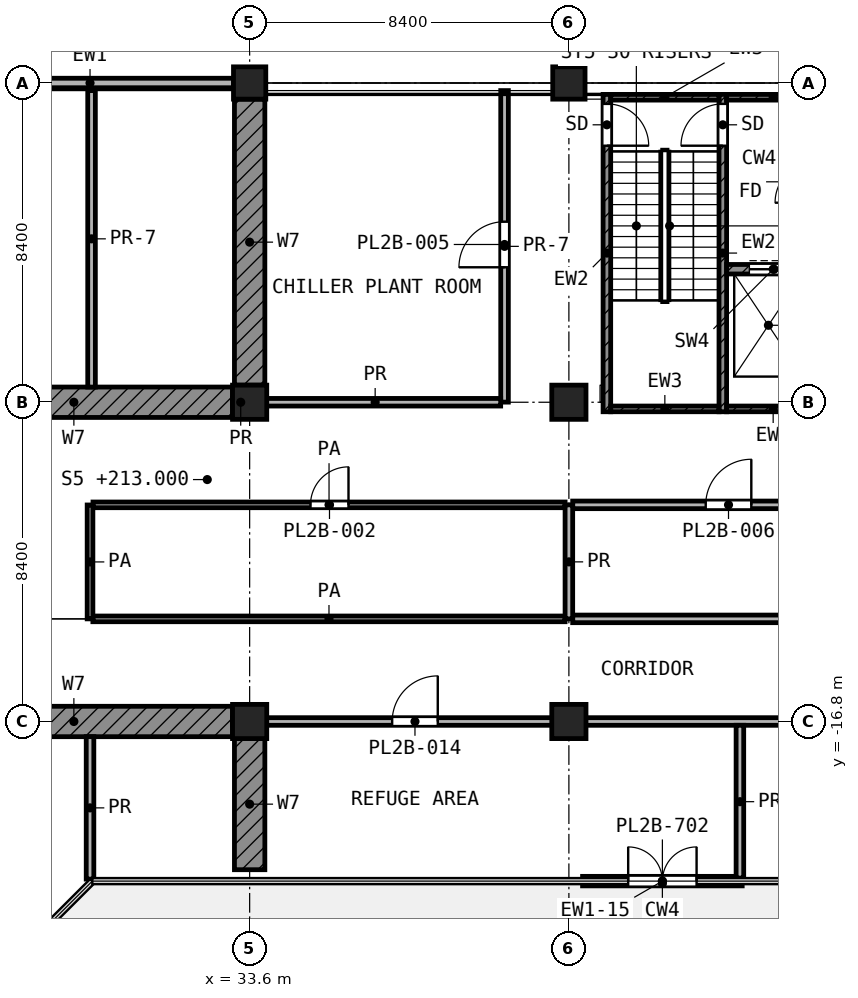
"""IFC4 building model, lengths in metres.
Left out: names, types, materials, properties, quantities, classifications, styles, units other than length and angle.
Written with IfcOpenShell. Run it as: python <this file> out.ifc"""

import sys

from ifc_helpers import new_model, si_unit, direction, frame, frame_2d, origin, origin_2d, place, context, subcontext, project, spatial, rectangle, extrude, element, fill, save


model = new_model("IFC4")
c1 = context("Model", 3, precision=1e-05, world=origin(), true_north=direction((0.0, 1.0)))
c2 = subcontext(c1, "Body", "Model", "MODEL_VIEW")
j1 = project(units=[si_unit("LENGTHUNIT", "METRE"), si_unit("PLANEANGLEUNIT", "RADIAN")], contexts=[c1])
p1 = place(None, origin())
s1 = spatial("IfcSite", under=j1, at=p1, CompositionType="ELEMENT")
p2 = place(p1, origin())
s2 = spatial("IfcBuilding", under=s1, at=p2, CompositionType="ELEMENT")
p3 = place(p2, frame((0.0, 0.0, 213.0)))
s3 = spatial("IfcBuildingStorey", under=s2, at=p3, CompositionType="ELEMENT", Elevation=213.0)
for number, where, z_axis, x_axis in (
    (1, (33.6, 0.0, 0.0), (0.0, 0.0, 1.0), (1.0, 0.0, 0.0)),
    (2, (42.0, 0.0, 0.0), (0.0, 0.0, 1.0), (1.0, 0.0, 0.0)),
):
    element("IfcColumn", number, at=place(p3, frame(where, z_axis=z_axis, x_axis=x_axis)), inside=s3, PredefinedType="COLUMN", context=c2, shape_type="SweptSolid", body=[
        extrude(rectangle(XDim=0.85, YDim=0.85, at=origin_2d()), origin(), (0.0, 0.0, 1.0), 5.0),
    ])
p4 = place(p3, frame((33.6, -8.4, 0.0), z_axis=(0.0, 0.0, 1.0), x_axis=(1.0, 0.0, 0.0)))
e3 = element("IfcColumn", 3, at=p4, inside=s3, PredefinedType="COLUMN", context=c2, shape_type="SweptSolid", body=[
    extrude(rectangle(XDim=0.9, YDim=0.9, at=origin_2d()), origin(), (0.0, 0.0, 1.0), 5.0),
])
for number, where, z_axis, x_axis in (
    (4, (42.0, -8.4, 0.0), (0.0, 0.0, 1.0), (1.0, 0.0, 0.0)),
    (5, (33.6, -16.8, 0.0), (0.0, 0.0, 1.0), (1.0, 0.0, 0.0)),
    (6, (42.0, -16.8, 0.0), (0.0, 0.0, 1.0), (1.0, 0.0, 0.0)),
):
    element("IfcColumn", number, at=place(p3, frame(where, z_axis=z_axis, x_axis=x_axis)), inside=s3, PredefinedType="COLUMN", context=c2, shape_type="SweptSolid", body=[
        extrude(rectangle(XDim=0.9, YDim=0.9, at=origin_2d()), origin(), (0.0, 0.0, 1.0), 5.0),
    ])
for number, where, z_axis, x_axis in (
    (7, (24.8, -8.4, 0.0), (0.0, 0.0, 1.0), (1.0, 0.0, 0.0)),
    (8, (24.8, -16.8, 0.0), (0.0, 0.0, 1.0), (1.0, 0.0, 0.0)),
):
    element("IfcWall", number, at=place(p3, frame(where, z_axis=z_axis, x_axis=x_axis)), inside=s3, PredefinedType="SHEAR", context=c2, shape_type="SweptSolid", body=[
        extrude(rectangle(XDim=8.35, YDim=0.8, at=frame_2d((4.175, 0.0))), origin(), (0.0, 0.0, 1.0), 4.4),
    ])
p5 = place(p3, frame((33.6, -0.425, 0.0), z_axis=(0.0, 0.0, 1.0), x_axis=(0.0, -1.0, 0.0)))
e9 = element("IfcWall", 9, at=p5, inside=s3, PredefinedType="SHEAR", context=c2, shape_type="SweptSolid", body=[
    extrude(rectangle(XDim=7.525, YDim=0.8, at=frame_2d((3.762, 0.0))), origin(), (0.0, 0.0, 1.0), 4.4),
])
p6 = place(p3, frame((33.6, -17.25, 0.0), z_axis=(0.0, 0.0, 1.0), x_axis=(0.0, -1.0, 0.0)))
e10 = element("IfcWall", 10, at=p6, inside=s3, PredefinedType="SHEAR", context=c2, shape_type="SweptSolid", body=[
    extrude(rectangle(XDim=3.45, YDim=0.8, at=frame_2d((1.725, 0.0))), origin(), (0.0, 0.0, 1.0), 4.4),
])
p7 = place(p3, frame((42.36, -21.0, 0.0), z_axis=(0.0, 0.0, 1.0), x_axis=(1.0, 0.0, 0.0)))
e11 = element("IfcWall", 11, at=p7, inside=s3, PredefinedType="SOLIDWALL", context=c2, shape_type="SweptSolid", body=[
    extrude(rectangle(XDim=4.2, YDim=0.25, at=frame_2d((2.1, 0.0))), origin(), (0.0, 0.0, 1.0), 4.24),
])
p8 = place(p7, frame((1.2, 0.0, 0.0)))
e12 = element("IfcOpeningElement", 12, at=p8, cuts=e11, PredefinedType="OPENING", context=c2, shape_type="SweptSolid", body=[
    extrude(rectangle(XDim=1.8, YDim=2.1, at=frame_2d((0.9, 1.05))), frame((0.0, 0.135, 0.0), z_axis=(0.0, -1.0, 0.0), x_axis=(1.0, 0.0, 0.0)), (0.0, 0.0, 1.0), 0.27),
])
p9 = place(p3, frame((33.175, 0.0, 0.0), z_axis=(0.0, 0.0, 1.0), x_axis=(-1.0, 0.0, 0.0)))
e13 = element("IfcWall", 13, at=p9, inside=s3, PredefinedType="SOLIDWALL", context=c2, shape_type="SweptSolid", body=[
    extrude(rectangle(XDim=7.55, YDim=0.25, at=frame_2d((3.775, 0.0))), origin(), (0.0, 0.0, 1.0), 3.2),
])
p10 = place(p3, frame((43.0, -8.65, 0.0), z_axis=(0.0, 0.0, 1.0), x_axis=(0.0, 1.0, 0.0)))
e14 = element("IfcWall", 14, at=p10, inside=s3, PredefinedType="SHEAR", context=c2, shape_type="SweptSolid", body=[
    extrude(rectangle(XDim=8.35, YDim=0.2, at=frame_2d((4.175, 0.0))), origin(), (0.0, 0.0, 1.0), 4.4),
])
p11 = place(p10, frame((7.0, 0.0, 0.0)))
e15 = element("IfcOpeningElement", 15, at=p11, cuts=e14, PredefinedType="OPENING", context=c2, shape_type="SweptSolid", body=[
    extrude(rectangle(XDim=1.1, YDim=2.1, at=frame_2d((0.55, 1.05))), frame((0.0, 0.11, 0.0), z_axis=(0.0, -1.0, 0.0), x_axis=(1.0, 0.0, 0.0)), (0.0, 0.0, 1.0), 0.22),
])
p12 = place(p3, frame((46.05, -8.65, 0.0), z_axis=(0.0, 0.0, 1.0), x_axis=(0.0, 1.0, 0.0)))
e16 = element("IfcWall", 16, at=p12, inside=s3, PredefinedType="SHEAR", context=c2, shape_type="SweptSolid", body=[
    extrude(rectangle(XDim=8.35, YDim=0.2, at=frame_2d((4.175, 0.0))), origin(), (0.0, 0.0, 1.0), 4.4),
])
p13 = place(p12, frame((7.0, 0.0, 0.0)))
e17 = element("IfcOpeningElement", 17, at=p13, cuts=e16, PredefinedType="OPENING", context=c2, shape_type="SweptSolid", body=[
    extrude(rectangle(XDim=1.1, YDim=2.1, at=frame_2d((0.55, 1.05))), frame((0.0, 0.11, 0.0), z_axis=(0.0, -1.0, 0.0), x_axis=(1.0, 0.0, 0.0)), (0.0, 0.0, 1.0), 0.22),
])
p14 = place(p3, frame((43.1, -0.375, 0.0), z_axis=(0.0, 0.0, 1.0), x_axis=(1.0, 0.0, 0.0)))
e18 = element("IfcWall", 18, at=p14, inside=s3, PredefinedType="SHEAR", context=c2, shape_type="SweptSolid", body=[
    extrude(rectangle(XDim=2.85, YDim=0.15, at=frame_2d((1.425, 0.0))), origin(), (0.0, 0.0, 1.0), 4.4),
])
p15 = place(p3, frame((46.15, -0.375, 0.0), z_axis=(0.0, 0.0, 1.0), x_axis=(1.0, 0.0, 0.0)))
e19 = element("IfcWall", 19, at=p15, inside=s3, PredefinedType="SHEAR", context=c2, shape_type="SweptSolid", body=[
    extrude(rectangle(XDim=2.45, YDim=0.15, at=frame_2d((1.225, 0.0))), origin(), (0.0, 0.0, 1.0), 4.4),
])
p16 = place(p3, frame((43.1, -8.575, 0.0), z_axis=(0.0, 0.0, 1.0), x_axis=(1.0, 0.0, 0.0)))
e20 = element("IfcWall", 20, at=p16, inside=s3, PredefinedType="SHEAR", context=c2, shape_type="SweptSolid", body=[
    extrude(rectangle(XDim=2.85, YDim=0.15, at=frame_2d((1.425, 0.0))), origin(), (0.0, 0.0, 1.0), 4.4),
])
p17 = place(p3, frame((46.15, -8.575, 0.0), z_axis=(0.0, 0.0, 1.0), x_axis=(1.0, 0.0, 0.0)))
e21 = element("IfcWall", 21, at=p17, inside=s3, PredefinedType="SHEAR", context=c2, shape_type="SweptSolid", body=[
    extrude(rectangle(XDim=2.45, YDim=0.15, at=frame_2d((1.225, 0.0))), origin(), (0.0, 0.0, 1.0), 4.4),
])
p18 = place(p3, frame((46.15, -4.9, 0.0), z_axis=(0.0, 0.0, 1.0), x_axis=(1.0, 0.0, 0.0)))
e22 = element("IfcWall", 22, at=p18, inside=s3, PredefinedType="SHEAR", context=c2, shape_type="SweptSolid", body=[
    extrude(rectangle(XDim=2.45, YDim=0.25, at=frame_2d((1.225, 0.0))), origin(), (0.0, 0.0, 1.0), 4.4),
])
p19 = place(p18, frame((0.6, 0.0, 0.0)))
e23 = element("IfcOpeningElement", 23, at=p19, cuts=e22, PredefinedType="OPENING", context=c2, shape_type="SweptSolid", body=[
    extrude(rectangle(XDim=1.3, YDim=2.1, at=frame_2d((0.65, 1.05))), frame((0.0, 0.135, 0.0), z_axis=(0.0, -1.0, 0.0), x_axis=(1.0, 0.0, 0.0)), (0.0, 0.0, 1.0), 0.27),
])
p20 = place(p3, frame((29.475, -14.1, 0.0), z_axis=(0.0, 0.0, 1.0), x_axis=(1.0, 0.0, 0.0)))
e24 = element("IfcWall", 24, at=p20, inside=s3, PredefinedType="PARTITIONING", context=c2, shape_type="SweptSolid", body=[
    extrude(rectangle(XDim=12.425, YDim=0.15, at=frame_2d((6.212, 0.0))), origin(), (0.0, 0.0, 1.0), 4.4),
])
p21 = place(p3, frame((29.478, -11.1, 0.0), z_axis=(0.0, 0.0, 1.0), x_axis=(1.0, 0.0, 0.0)))
e25 = element("IfcWall", 25, at=p21, inside=s3, PredefinedType="PARTITIONING", context=c2, shape_type="SweptSolid", body=[
    extrude(rectangle(XDim=12.422, YDim=0.15, at=frame_2d((6.211, 0.0))), origin(), (0.0, 0.0, 1.0), 4.4),
])
p22 = place(p21, frame((5.723, 0.0, 0.0)))
e26 = element("IfcOpeningElement", 26, at=p22, cuts=e25, PredefinedType="OPENING", context=c2, shape_type="SweptSolid", body=[
    extrude(rectangle(XDim=1.0, YDim=2.1, at=frame_2d((0.5, 1.05))), frame((0.0, 0.085, 0.0), z_axis=(0.0, -1.0, 0.0), x_axis=(1.0, 0.0, 0.0)), (0.0, 0.0, 1.0), 0.17),
])
p23 = place(p3, frame((29.4, -14.1, 0.0), z_axis=(0.0, 0.0, 1.0), x_axis=(0.0, 1.0, 0.0)))
e27 = element("IfcWall", 27, at=p23, inside=s3, PredefinedType="PARTITIONING", context=c2, shape_type="SweptSolid", body=[
    extrude(rectangle(XDim=2.997, YDim=0.15, at=frame_2d((1.499, 0.0))), origin(), (0.0, 0.0, 1.0), 4.4),
])
p24 = place(p3, frame((33.15, -16.8, 0.0), z_axis=(0.0, 0.0, 1.0), x_axis=(1.0, 0.0, 0.0)))
e28 = element("IfcWall", 28, at=p24, inside=s3, PredefinedType="PARTITIONING", context=c2, shape_type="SweptSolid", body=[
    extrude(rectangle(XDim=29.771, YDim=0.2, at=frame_2d((14.885, 0.0))), origin(), (0.0, 0.0, 1.0), 4.4),
])
p25 = place(p24, frame((4.2, 0.0, 0.0)))
e29 = element("IfcOpeningElement", 29, at=p25, cuts=e28, PredefinedType="OPENING", context=c2, shape_type="SweptSolid", body=[
    extrude(rectangle(XDim=1.2, YDim=2.1, at=frame_2d((0.6, 1.05))), frame((0.0, 0.11, 0.0), z_axis=(0.0, -1.0, 0.0), x_axis=(1.0, 0.0, 0.0)), (0.0, 0.0, 1.0), 0.22),
])
p26 = place(p24, frame((17.8, 0.0, 0.0)))
e30 = element("IfcOpeningElement", 30, at=p26, cuts=e28, PredefinedType="OPENING", context=c2, shape_type="SweptSolid", body=[
    extrude(rectangle(XDim=1.2, YDim=2.1, at=frame_2d((0.6, 1.05))), frame((0.0, 0.11, 0.0), z_axis=(0.0, -1.0, 0.0), x_axis=(1.0, 0.0, 0.0)), (0.0, 0.0, 1.0), 0.22),
])
p27 = place(p24, frame((23.95, 0.0, 0.0)))
e31 = element("IfcOpeningElement", 31, at=p27, cuts=e28, PredefinedType="OPENING", context=c2, shape_type="SweptSolid", body=[
    extrude(rectangle(XDim=1.2, YDim=2.1, at=frame_2d((0.6, 1.05))), frame((0.0, 0.11, 0.0), z_axis=(0.0, -1.0, 0.0), x_axis=(1.0, 0.0, 0.0)), (0.0, 0.0, 1.0), 0.22),
])
p28 = place(p3, frame((42.1, -14.1, 0.0), z_axis=(0.0, 0.0, 1.0), x_axis=(1.0, 0.0, 0.0)))
e32 = element("IfcWall", 32, at=p28, inside=s3, PredefinedType="PARTITIONING", context=c2, shape_type="SweptSolid", body=[
    extrude(rectangle(XDim=18.1, YDim=0.2, at=frame_2d((9.05, 0.0))), origin(), (0.0, 0.0, 1.0), 4.4),
])
p29 = place(p28, frame((12.65, 0.0, 0.0)))
e33 = element("IfcOpeningElement", 33, at=p29, cuts=e32, PredefinedType="OPENING", context=c2, shape_type="SweptSolid", body=[
    extrude(rectangle(XDim=1.2, YDim=2.1, at=frame_2d((0.6, 1.05))), frame((0.0, 0.11, 0.0), z_axis=(0.0, -1.0, 0.0), x_axis=(1.0, 0.0, 0.0)), (0.0, 0.0, 1.0), 0.22),
])
p30 = place(p3, frame((42.1, -11.1, 0.0), z_axis=(0.0, 0.0, 1.0), x_axis=(1.0, 0.0, 0.0)))
e34 = element("IfcWall", 34, at=p30, inside=s3, PredefinedType="PARTITIONING", context=c2, shape_type="SweptSolid", body=[
    extrude(rectangle(XDim=18.097, YDim=0.2, at=frame_2d((9.048, 0.0))), origin(), (0.0, 0.0, 1.0), 4.4),
])
p31 = place(p30, frame((3.5, 0.0, 0.0)))
e35 = element("IfcOpeningElement", 35, at=p31, cuts=e34, PredefinedType="OPENING", context=c2, shape_type="SweptSolid", body=[
    extrude(rectangle(XDim=1.2, YDim=2.1, at=frame_2d((0.6, 1.05))), frame((0.0, 0.11, 0.0), z_axis=(0.0, -1.0, 0.0), x_axis=(1.0, 0.0, 0.0)), (0.0, 0.0, 1.0), 0.22),
])
p32 = place(p3, frame((33.15, -8.4, 0.0), z_axis=(0.0, 0.0, 1.0), x_axis=(1.0, 0.0, 0.0)))
e36 = element("IfcWall", 36, at=p32, inside=s3, PredefinedType="PARTITIONING", context=c2, shape_type="SweptSolid", body=[
    extrude(rectangle(XDim=0.43, YDim=0.2, at=frame_2d((0.215, 0.0))), origin(), (0.0, 0.0, 1.0), 4.4),
])
e37 = element("IfcWall", 37, at=p4, inside=s3, PredefinedType="PARTITIONING", context=c2, shape_type="SweptSolid", body=[
    extrude(rectangle(XDim=6.605, YDim=0.2, at=frame_2d((3.302, 0.0))), origin(), (0.0, 0.0, 1.0), 4.4),
])
p33 = place(p3, frame((29.4, -20.947, 0.0), z_axis=(0.0, 0.0, 1.0), x_axis=(0.0, 1.0, 0.0)))
e38 = element("IfcWall", 38, at=p33, inside=s3, PredefinedType="PARTITIONING", context=c2, shape_type="SweptSolid", body=[
    extrude(rectangle(XDim=3.748, YDim=0.2, at=frame_2d((1.874, 0.0))), origin(), (0.0, 0.0, 1.0), 4.4),
])
p34 = place(p3, frame((29.44, -8.001, 0.0), z_axis=(0.0, 0.0, 1.0), x_axis=(0.0, 1.0, 0.0)))
e39 = element("IfcWall", 39, at=p34, inside=s3, PredefinedType="PARTITIONING", context=c2, shape_type="SweptSolid", body=[
    extrude(rectangle(XDim=7.801, YDim=0.2, at=frame_2d((3.9, 0.0))), origin(), (0.0, 0.0, 1.0), 3.2),
])
p35 = place(p3, frame((40.307, -8.397, 0.0), z_axis=(0.0, 0.0, 1.0), x_axis=(0.0, 1.0, 0.0)))
e40 = element("IfcWall", 40, at=p35, inside=s3, PredefinedType="PARTITIONING", context=c2, shape_type="SweptSolid", body=[
    extrude(rectangle(XDim=8.197, YDim=0.2, at=frame_2d((4.099, 0.0))), origin(), (0.0, 0.0, 1.0), 3.2),
])
p36 = place(p35, frame((3.548, 0.0, 0.0)))
e41 = element("IfcOpeningElement", 41, at=p36, cuts=e40, PredefinedType="OPENING", context=c2, shape_type="SweptSolid", body=[
    extrude(rectangle(XDim=1.2, YDim=2.1, at=frame_2d((0.6, 1.05))), frame((0.0, 0.11, 0.0), z_axis=(0.0, -1.0, 0.0), x_axis=(1.0, 0.0, 0.0)), (0.0, 0.0, 1.0), 0.22),
])
p37 = place(p3, frame((42.0, -14.1, 0.0), z_axis=(0.0, 0.0, 1.0), x_axis=(0.0, 1.0, 0.0)))
e42 = element("IfcWall", 42, at=p37, inside=s3, PredefinedType="PARTITIONING", context=c2, shape_type="SweptSolid", body=[
    extrude(rectangle(XDim=3.0, YDim=0.2, at=frame_2d((1.5, 0.0))), origin(), (0.0, 0.0, 1.0), 4.4),
])
p38 = place(p3, frame((46.5, -20.92, 0.0), z_axis=(0.0, 0.0, 1.0), x_axis=(0.0, 1.0, 0.0)))
e43 = element("IfcWall", 43, at=p38, inside=s3, PredefinedType="PARTITIONING", context=c2, shape_type="SweptSolid", body=[
    extrude(rectangle(XDim=4.02, YDim=0.2, at=frame_2d((2.01, 0.0))), origin(), (0.0, 0.0, 1.0), 4.4),
])
p39 = place(p8, origin())
e44 = element("IfcDoor", 44, at=p39, inside=s3, OperationType="DOUBLE_DOOR_SINGLE_SWING", PredefinedType="DOOR", context=c2, shape_type="SweptSolid", body=[
    extrude(rectangle(XDim=1.8, YDim=2.1, at=frame_2d((0.9, 1.05))), frame((0.0, 0.025, 0.0), z_axis=(0.0, -1.0, 0.0), x_axis=(1.0, 0.0, 0.0)), (0.0, 0.0, 1.0), 0.05),
])
fill(e12, e44)
p40 = place(p11, frame((1.1, 0.0, 0.0), z_axis=(0.0, 0.0, 1.0), x_axis=(-1.0, 0.0, 0.0)))
e45 = element("IfcDoor", 45, at=p40, inside=s3, OperationType="SINGLE_SWING_LEFT", PredefinedType="DOOR", context=c2, shape_type="SweptSolid", body=[
    extrude(rectangle(XDim=1.1, YDim=2.1, at=frame_2d((0.55, 1.05))), frame((0.0, 0.025, 0.0), z_axis=(0.0, -1.0, 0.0), x_axis=(1.0, 0.0, 0.0)), (0.0, 0.0, 1.0), 0.05),
])
fill(e15, e45)
p41 = place(p13, origin())
e46 = element("IfcDoor", 46, at=p41, inside=s3, OperationType="SINGLE_SWING_LEFT", PredefinedType="DOOR", context=c2, shape_type="SweptSolid", body=[
    extrude(rectangle(XDim=1.1, YDim=2.1, at=frame_2d((0.55, 1.05))), frame((0.0, 0.025, 0.0), z_axis=(0.0, -1.0, 0.0), x_axis=(1.0, 0.0, 0.0)), (0.0, 0.0, 1.0), 0.05),
])
fill(e17, e46)
p42 = place(p19, origin())
e47 = element("IfcDoor", 47, at=p42, inside=s3, OperationType="DOUBLE_DOOR_SLIDING", PredefinedType="DOOR", context=c2, shape_type="SweptSolid", body=[
    extrude(rectangle(XDim=1.3, YDim=2.1, at=frame_2d((0.65, 1.05))), frame((0.0, 0.025, 0.0), z_axis=(0.0, -1.0, 0.0), x_axis=(1.0, 0.0, 0.0)), (0.0, 0.0, 1.0), 0.05),
])
fill(e23, e47)
p43 = place(p36, origin())
e48 = element("IfcDoor", 48, at=p43, inside=s3, OperationType="SINGLE_SWING_LEFT", PredefinedType="DOOR", context=c2, shape_type="SweptSolid", body=[
    extrude(rectangle(XDim=1.2, YDim=2.1, at=frame_2d((0.6, 1.05))), frame((0.0, 0.025, 0.0), z_axis=(0.0, -1.0, 0.0), x_axis=(1.0, 0.0, 0.0)), (0.0, 0.0, 1.0), 0.05),
])
fill(e41, e48)
p44 = place(p22, origin())
e49 = element("IfcDoor", 49, at=p44, inside=s3, OperationType="SINGLE_SWING_RIGHT", PredefinedType="DOOR", context=c2, shape_type="SweptSolid", body=[
    extrude(rectangle(XDim=1.0, YDim=2.1, at=frame_2d((0.5, 1.05))), frame((0.0, 0.025, 0.0), z_axis=(0.0, -1.0, 0.0), x_axis=(1.0, 0.0, 0.0)), (0.0, 0.0, 1.0), 0.05),
])
fill(e26, e49)
p45 = place(p31, origin())
e50 = element("IfcDoor", 50, at=p45, inside=s3, OperationType="SINGLE_SWING_RIGHT", PredefinedType="DOOR", context=c2, shape_type="SweptSolid", body=[
    extrude(rectangle(XDim=1.2, YDim=2.1, at=frame_2d((0.6, 1.05))), frame((0.0, 0.025, 0.0), z_axis=(0.0, -1.0, 0.0), x_axis=(1.0, 0.0, 0.0)), (0.0, 0.0, 1.0), 0.05),
])
fill(e35, e50)
p46 = place(p25, origin())
e51 = element("IfcDoor", 51, at=p46, inside=s3, OperationType="SINGLE_SWING_RIGHT", PredefinedType="DOOR", context=c2, shape_type="SweptSolid", body=[
    extrude(rectangle(XDim=1.2, YDim=2.1, at=frame_2d((0.6, 1.05))), frame((0.0, 0.025, 0.0), z_axis=(0.0, -1.0, 0.0), x_axis=(1.0, 0.0, 0.0)), (0.0, 0.0, 1.0), 0.05),
])
fill(e29, e51)
save(model, sys.argv[1])
